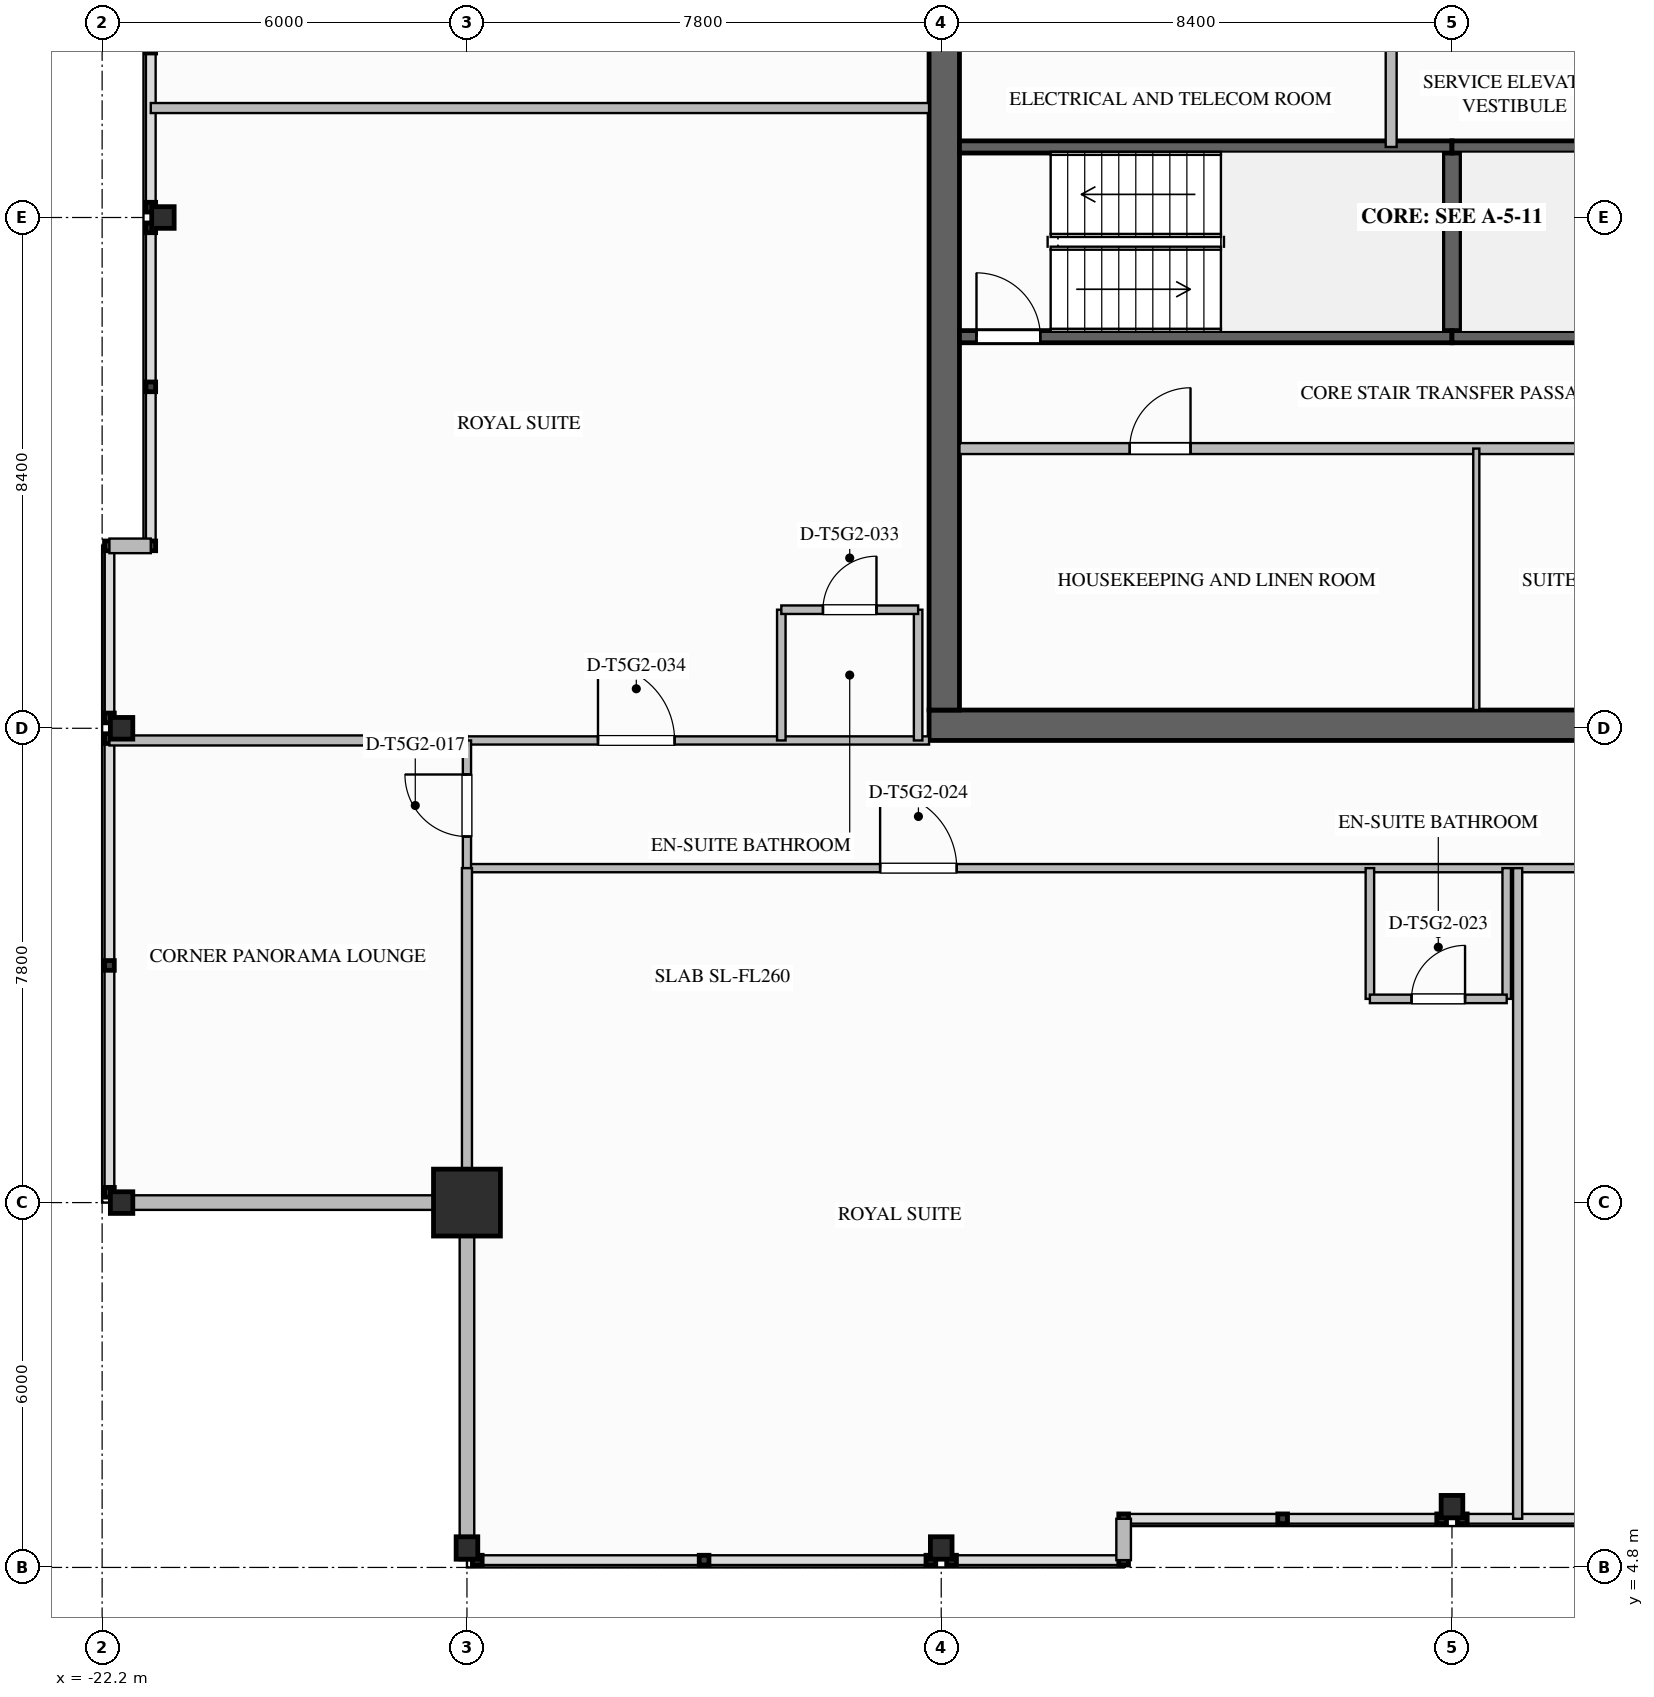
"""IFC4 building model, lengths in metres.
Left out: names, types, materials, properties, quantities, classifications, styles, units other than length and angle.
Written with IfcOpenShell. Run it as: python <this file> out.ifc"""

import sys

from ifc_helpers import new_model, si_unit, direction, frame, frame_2d, origin, origin_2d, place, context, subcontext, project, spatial, rectangle, i_section, extrude, element, fill, save


model = new_model("IFC4")
c1 = context("Model", 3, precision=1e-05, world=origin(), true_north=direction((0.0, 1.0)))
c2 = subcontext(c1, "Body", "Model", "MODEL_VIEW")
j1 = project(units=[si_unit("LENGTHUNIT", "METRE"), si_unit("PLANEANGLEUNIT", "RADIAN")], contexts=[c1])
p1 = place(None, origin())
s1 = spatial("IfcSite", under=j1, at=p1, CompositionType="ELEMENT")
p2 = place(p1, origin())
s2 = spatial("IfcBuilding", under=s1, at=p2, CompositionType="ELEMENT")
p3 = place(p2, frame((0.0, 0.0, 275.95)))
s3 = spatial("IfcBuildingStorey", under=s2, at=p3, CompositionType="ELEMENT", Elevation=275.95)
p4 = place(p3, frame((8.6, 18.65, 0.0), z_axis=(0.0, 0.0, 1.0), x_axis=(-1.0, 0.0, 0.0)))
e1 = element("IfcWall", 1, at=p4, inside=s3, PredefinedType="SHEAR", context=c2, shape_type="SweptSolid", body=[
    extrude(rectangle(XDim=17.2, YDim=0.5, at=frame_2d((8.6, 0.0))), origin(), (0.0, 0.0, 1.0), 3.65),
])
p5 = place(p3, frame((-8.35, 18.9, 0.0), z_axis=(0.0, 0.0, 1.0), x_axis=(0.0, 1.0, 0.0)))
e2 = element("IfcWall", 2, at=p5, inside=s3, PredefinedType="SHEAR", context=c2, shape_type="SweptSolid", body=[
    extrude(rectangle(XDim=16.2, YDim=0.5, at=frame_2d((8.1, 0.0))), origin(), (0.0, 0.0, 1.0), 3.65),
])
p6 = place(p3, frame((-16.2, 10.8, 0.0), z_axis=(0.0, 0.0, 1.0), x_axis=(1.0, 0.0, 0.0)))
e3 = element("IfcColumn", 3, at=p6, inside=s3, PredefinedType="COLUMN", context=c2, shape_type="SweptSolid", body=[
    extrude(rectangle(XDim=1.1, YDim=1.1, at=origin_2d()), origin(), (0.0, 0.0, 1.0), 3.65),
])
for number, where, z_axis, x_axis in (
    (4, (-21.88, 10.8, 0.0), (0.0, 0.0, 1.0), (1.0, 0.0, 0.0)),
    (5, (-21.88, 18.6, 0.0), (0.0, 0.0, 1.0), (1.0, 0.0, 0.0)),
    (6, (-21.2, 27.0, 0.0), (0.0, 0.0, 1.0), (1.0, 0.0, 0.0)),
    (7, (-16.2, 5.12, 0.0), (0.0, 0.0, 1.0), (0.0, 1.0, 0.0)),
    (8, (-8.4, 5.12, 0.0), (0.0, 0.0, 1.0), (0.0, 1.0, 0.0)),
    (9, (0.0, 5.8, 0.0), (0.0, 0.0, 1.0), (0.0, 1.0, 0.0)),
):
    element("IfcColumn", number, at=place(p3, frame(where, z_axis=z_axis, x_axis=x_axis)), inside=s3, PredefinedType="COLUMN", context=c2, shape_type="SweptSolid", body=[
        extrude(i_section(OverallWidth=0.369, OverallDepth=0.356, WebThickness=0.011, FlangeThickness=0.018, FilletRadius=0.025, at=origin_2d()), origin(), (0.0, 0.0, 1.0), 3.647),
    ])
for number, where, z_axis, x_axis in (
    (10, (-16.2, 4.92, 0.0), (0.0, 0.0, 1.0), (0.0, 1.0, 0.0)),
    (11, (-16.2, 10.8, 0.0), (0.0, 0.0, 1.0), (-1.0, 0.0, 0.0)),
):
    element("IfcWall", number, at=place(p3, frame(where, z_axis=z_axis, x_axis=x_axis)), inside=s3, PredefinedType="STANDARD", context=c2, shape_type="SweptSolid", body=[
        extrude(rectangle(XDim=5.88, YDim=0.24, at=frame_2d((2.94, 0.0))), origin(), (0.0, 0.0, 1.0), 2.779),
    ])
for number, where, z_axis, x_axis in (
    (12, (-22.08, 21.6, 0.0), (0.0, 0.0, 1.0), (1.0, 0.0, 0.0)),
    (13, (-5.4, 5.6, 0.0), (0.0, 0.0, 1.0), (0.0, -1.0, 0.0)),
):
    element("IfcWall", number, at=place(p3, frame(where, z_axis=z_axis, x_axis=x_axis)), inside=s3, PredefinedType="STANDARD", context=c2, shape_type="SweptSolid", body=[
        extrude(rectangle(XDim=0.68, YDim=0.24, at=frame_2d((0.34, 0.0))), origin(), (0.0, 0.0, 1.0), 3.39),
    ])
p7 = place(p3, frame((0.0, 25.04, 0.0), z_axis=(0.0, 0.0, 1.0), x_axis=(0.0, 1.0, 0.0)))
e14 = element("IfcWall", 14, at=p7, inside=s3, PredefinedType="SOLIDWALL", context=c2, shape_type="SweptSolid", body=[
    extrude(rectangle(XDim=3.12, YDim=0.3, at=frame_2d((1.56, 0.0))), origin(), (0.0, 0.0, 1.0), 3.39),
])
p8 = place(p3, frame((-8.1, 25.04, 0.0), z_axis=(0.0, 0.0, 1.0), x_axis=(1.0, 0.0, 0.0)))
e15 = element("IfcWall", 15, at=p8, inside=s3, PredefinedType="SOLIDWALL", context=c2, shape_type="SweptSolid", body=[
    extrude(rectangle(XDim=8.1, YDim=0.2, at=frame_2d((4.05, 0.0))), origin(), (0.0, 0.0, 1.0), 3.39),
])
p9 = place(p8, frame((0.28, 0.0, 0.0)))
e16 = element("IfcOpeningElement", 16, at=p9, cuts=e15, PredefinedType="OPENING", context=c2, shape_type="SweptSolid", body=[
    extrude(rectangle(XDim=1.05, YDim=2.1, at=frame_2d((0.525, 1.05))), frame((0.0, 0.11, 0.0), z_axis=(0.0, -1.0, 0.0), x_axis=(1.0, 0.0, 0.0)), (0.0, 0.0, 1.0), 0.22),
])
for number, where, z_axis, x_axis in (
    (17, (-8.1, 28.16, 0.0), (0.0, 0.0, 1.0), (1.0, 0.0, 0.0)),
    (18, (0.0, 25.04, 0.0), (0.0, 0.0, 1.0), (1.0, 0.0, 0.0)),
):
    element("IfcWall", number, at=place(p3, frame(where, z_axis=z_axis, x_axis=x_axis)), inside=s3, PredefinedType="SOLIDWALL", context=c2, shape_type="SweptSolid", body=[
        extrude(rectangle(XDim=8.1, YDim=0.2, at=frame_2d((4.05, 0.0))), origin(), (0.0, 0.0, 1.0), 3.39),
    ])
p10 = place(p3, frame((8.1, 28.16, 0.0), z_axis=(0.0, 0.0, 1.0), x_axis=(-1.0, 0.0, 0.0)))
e19 = element("IfcWall", 19, at=p10, inside=s3, PredefinedType="SOLIDWALL", context=c2, shape_type="SweptSolid", body=[
    extrude(rectangle(XDim=8.1, YDim=0.2, at=frame_2d((4.05, 0.0))), origin(), (0.0, 0.0, 1.0), 3.39),
])
p11 = place(p10, frame((0.28, 0.0, 0.0)))
e20 = element("IfcOpeningElement", 20, at=p11, cuts=e19, PredefinedType="OPENING", context=c2, shape_type="SweptSolid", body=[
    extrude(rectangle(XDim=1.05, YDim=2.1, at=frame_2d((0.525, 1.05))), frame((0.0, 0.11, 0.0), z_axis=(0.0, -1.0, 0.0), x_axis=(1.0, 0.0, 0.0)), (0.0, 0.0, 1.0), 0.22),
])
p12 = place(p3, frame((-1.0, 28.16, 0.0), z_axis=(0.0, 0.0, 1.0), x_axis=(0.0, 1.0, 0.0)))
e21 = element("IfcWall", 21, at=p12, inside=s3, PredefinedType="SOLIDWALL", context=c2, shape_type="SweptSolid", body=[
    extrude(rectangle(XDim=4.02, YDim=0.18, at=frame_2d((2.01, 0.0))), origin(), (0.0, 0.0, 1.0), 3.39),
])
p13 = place(p12, frame((2.49, 0.0, 0.0)))
e22 = element("IfcOpeningElement", 22, at=p13, cuts=e21, PredefinedType="OPENING", context=c2, shape_type="SweptSolid", body=[
    extrude(rectangle(XDim=1.0, YDim=2.1, at=frame_2d((0.5, 1.05))), frame((0.0, 0.1, 0.0), z_axis=(0.0, -1.0, 0.0), x_axis=(1.0, 0.0, 0.0)), (0.0, 0.0, 1.0), 0.2),
])
p14 = place(p3, frame((-8.1, 23.2, 0.0), z_axis=(0.0, 0.0, 1.0), x_axis=(1.0, 0.0, 0.0)))
e23 = element("IfcWall", 23, at=p14, inside=s3, PredefinedType="SOLIDWALL", context=c2, shape_type="SweptSolid", body=[
    extrude(rectangle(XDim=16.2, YDim=0.18, at=frame_2d((8.1, 0.0))), origin(), (0.0, 0.0, 1.0), 3.39),
])
p15 = place(p14, frame((2.8, 0.0, 0.0)))
e24 = element("IfcOpeningElement", 24, at=p15, cuts=e23, PredefinedType="OPENING", context=c2, shape_type="SweptSolid", body=[
    extrude(rectangle(XDim=1.0, YDim=2.1, at=frame_2d((0.5, 1.05))), frame((0.0, 0.1, 0.0), z_axis=(0.0, -1.0, 0.0), x_axis=(1.0, 0.0, 0.0)), (0.0, 0.0, 1.0), 0.2),
])
p16 = place(p14, frame((11.5, 0.0, 0.0)))
e25 = element("IfcOpeningElement", 25, at=p16, cuts=e23, PredefinedType="OPENING", context=c2, shape_type="SweptSolid", body=[
    extrude(rectangle(XDim=1.0, YDim=2.1, at=frame_2d((0.5, 1.05))), frame((0.0, 0.1, 0.0), z_axis=(0.0, -1.0, 0.0), x_axis=(1.0, 0.0, 0.0)), (0.0, 0.0, 1.0), 0.2),
])
p17 = place(p3, frame((0.4, 18.9, 0.0), z_axis=(0.0, 0.0, 1.0), x_axis=(0.0, 1.0, 0.0)))
e26 = element("IfcWall", 26, at=p17, inside=s3, PredefinedType="PARTITIONING", context=c2, shape_type="SweptSolid", body=[
    extrude(rectangle(XDim=4.3, YDim=0.1, at=frame_2d((2.15, 0.0))), origin(), (0.0, 0.0, 1.0), 3.39),
])
p18 = place(p3, frame((-16.2, 16.3, 0.0), z_axis=(0.0, 0.0, 1.0), x_axis=(1.0, 0.0, 0.0)))
e27 = element("IfcWall", 27, at=p18, inside=s3, PredefinedType="PARTITIONING", context=c2, shape_type="SweptSolid", body=[
    extrude(rectangle(XDim=38.28, YDim=0.135, at=frame_2d((19.14, 0.0))), origin(), (0.0, 0.0, 1.0), 3.39),
])
p19 = place(p18, frame((33.355, 0.0, 0.0)))
e28 = element("IfcOpeningElement", 28, at=p19, cuts=e27, PredefinedType="OPENING", context=c2, shape_type="SweptSolid", body=[
    extrude(rectangle(XDim=1.26, YDim=2.2, at=frame_2d((0.63, 1.1))), frame((0.0, 0.077, 0.0), z_axis=(0.0, -1.0, 0.0), x_axis=(1.0, 0.0, 0.0)), (0.0, 0.0, 1.0), 0.155),
])
p20 = place(p18, frame((6.795, 0.0, 0.0)))
e29 = element("IfcOpeningElement", 29, at=p20, cuts=e27, PredefinedType="OPENING", context=c2, shape_type="SweptSolid", body=[
    extrude(rectangle(XDim=1.26, YDim=2.2, at=frame_2d((0.63, 1.1))), frame((0.0, 0.077, 0.0), z_axis=(0.0, -1.0, 0.0), x_axis=(1.0, 0.0, 0.0)), (0.0, 0.0, 1.0), 0.155),
])
p21 = place(p18, frame((24.33, 0.0, 0.0)))
e30 = element("IfcOpeningElement", 30, at=p21, cuts=e27, PredefinedType="OPENING", context=c2, shape_type="SweptSolid", body=[
    extrude(rectangle(XDim=1.02, YDim=2.15, at=frame_2d((0.51, 1.075))), frame((0.0, 0.077, 0.0), z_axis=(0.0, -1.0, 0.0), x_axis=(1.0, 0.0, 0.0)), (0.0, 0.0, 1.0), 0.155),
])
p22 = place(p3, frame((-16.2, 18.4, 0.0), z_axis=(0.0, 0.0, 1.0), x_axis=(1.0, 0.0, 0.0)))
e31 = element("IfcWall", 31, at=p22, inside=s3, PredefinedType="PARTITIONING", context=c2, shape_type="SweptSolid", body=[
    extrude(rectangle(XDim=7.6, YDim=0.135, at=frame_2d((3.8, 0.0))), origin(), (0.0, 0.0, 1.0), 2.767),
])
p23 = place(p22, frame((2.155, 0.0, 0.0)))
e32 = element("IfcOpeningElement", 32, at=p23, cuts=e31, PredefinedType="OPENING", context=c2, shape_type="SweptSolid", body=[
    extrude(rectangle(XDim=1.26, YDim=2.2, at=frame_2d((0.63, 1.1))), frame((0.0, 0.077, 0.0), z_axis=(0.0, -1.0, 0.0), x_axis=(1.0, 0.0, 0.0)), (0.0, 0.0, 1.0), 0.155),
])
p24 = place(p3, frame((-16.2, 16.3, 0.0), z_axis=(0.0, 0.0, 1.0), x_axis=(0.0, 1.0, 0.0)))
e33 = element("IfcWall", 33, at=p24, inside=s3, PredefinedType="PARTITIONING", context=c2, shape_type="SweptSolid", body=[
    extrude(rectangle(XDim=2.1, YDim=0.135, at=frame_2d((1.05, 0.0))), origin(), (0.0, 0.0, 1.0), 2.764),
])
p25 = place(p24, frame((0.52, 0.0, 0.0)))
e34 = element("IfcOpeningElement", 34, at=p25, cuts=e33, PredefinedType="OPENING", context=c2, shape_type="SweptSolid", body=[
    extrude(rectangle(XDim=1.02, YDim=2.15, at=frame_2d((0.51, 1.075))), frame((0.0, 0.077, 0.0), z_axis=(0.0, -1.0, 0.0), x_axis=(1.0, 0.0, 0.0)), (0.0, 0.0, 1.0), 0.155),
])
p26 = place(p3, frame((-16.2, 10.92, 0.0), z_axis=(0.0, 0.0, 1.0), x_axis=(0.0, 1.0, 0.0)))
e35 = element("IfcWall", 35, at=p26, inside=s3, PredefinedType="PARTITIONING", context=c2, shape_type="SweptSolid", body=[
    extrude(rectangle(XDim=5.38, YDim=0.165, at=frame_2d((2.69, 0.0))), origin(), (0.0, 0.0, 1.0), 2.764),
])
p27 = place(p3, frame((-22.08, 18.4, 0.0), z_axis=(0.0, 0.0, 1.0), x_axis=(1.0, 0.0, 0.0)))
e36 = element("IfcWall", 36, at=p27, inside=s3, PredefinedType="PARTITIONING", context=c2, shape_type="SweptSolid", body=[
    extrude(rectangle(XDim=5.88, YDim=0.165, at=frame_2d((2.94, 0.0))), origin(), (0.0, 0.0, 1.0), 2.764),
])
for number, where, z_axis, x_axis in (
    (37, (-1.35, 16.3, 0.0), (0.0, 0.0, 1.0), (0.0, -1.0, 0.0)),
    (38, (0.9, 16.3, 0.0), (0.0, 0.0, 1.0), (0.0, -1.0, 0.0)),
):
    element("IfcWall", number, at=place(p3, frame(where, z_axis=z_axis, x_axis=x_axis)), inside=s3, PredefinedType="PLUMBINGWALL", context=c2, shape_type="SweptSolid", body=[
        extrude(rectangle(XDim=2.15, YDim=0.14, at=frame_2d((1.075, 0.0))), origin(), (0.0, 0.0, 1.0), 3.39),
    ])
p28 = place(p3, frame((-1.35, 14.15, 0.0), z_axis=(0.0, 0.0, 1.0), x_axis=(1.0, 0.0, 0.0)))
e39 = element("IfcWall", 39, at=p28, inside=s3, PredefinedType="PLUMBINGWALL", context=c2, shape_type="SweptSolid", body=[
    extrude(rectangle(XDim=2.25, YDim=0.14, at=frame_2d((1.125, 0.0))), origin(), (0.0, 0.0, 1.0), 3.39),
])
p29 = place(p28, frame((0.685, 0.0, 0.0)))
e40 = element("IfcOpeningElement", 40, at=p29, cuts=e39, PredefinedType="OPENING", context=c2, shape_type="SweptSolid", body=[
    extrude(rectangle(XDim=0.88, YDim=2.1, at=frame_2d((0.44, 1.05))), frame((0.0, 0.08, 0.0), z_axis=(0.0, -1.0, 0.0), x_axis=(1.0, 0.0, 0.0)), (0.0, 0.0, 1.0), 0.16),
])
p30 = place(p3, frame((1.08, 5.6, 0.0), z_axis=(0.0, 0.0, 1.0), x_axis=(0.0, 1.0, 0.0)))
e41 = element("IfcWall", 41, at=p30, inside=s3, PredefinedType="PARTITIONING", context=c2, shape_type="SweptSolid", body=[
    extrude(rectangle(XDim=10.7, YDim=0.15, at=frame_2d((5.35, 0.0))), origin(), (0.0, 0.0, 1.0), 3.39),
])
p31 = place(p3, frame((-21.4, 28.8, 0.0), z_axis=(0.0, 0.0, 1.0), x_axis=(1.0, 0.0, 0.0)))
e42 = element("IfcWall", 42, at=p31, inside=s3, PredefinedType="PARTITIONING", context=c2, shape_type="SweptSolid", body=[
    extrude(rectangle(XDim=12.8, YDim=0.165, at=frame_2d((6.4, 0.0))), origin(), (0.0, 0.0, 1.0), 3.39),
])
for number, where, z_axis, x_axis in (
    (43, (-11.03, 18.4, 0.0), (0.0, 0.0, 1.0), (0.0, 1.0, 0.0)),
    (44, (-8.78, 18.4, 0.0), (0.0, 0.0, 1.0), (0.0, 1.0, 0.0)),
):
    element("IfcWall", number, at=place(p3, frame(where, z_axis=z_axis, x_axis=x_axis)), inside=s3, PredefinedType="PLUMBINGWALL", context=c2, shape_type="SweptSolid", body=[
        extrude(rectangle(XDim=2.15, YDim=0.14, at=frame_2d((1.075, 0.0))), origin(), (0.0, 0.0, 1.0), 3.39),
    ])
p32 = place(p3, frame((-11.03, 20.55, 0.0), z_axis=(0.0, 0.0, 1.0), x_axis=(1.0, 0.0, 0.0)))
e45 = element("IfcWall", 45, at=p32, inside=s3, PredefinedType="PLUMBINGWALL", context=c2, shape_type="SweptSolid", body=[
    extrude(rectangle(XDim=2.25, YDim=0.14, at=frame_2d((1.125, 0.0))), origin(), (0.0, 0.0, 1.0), 3.39),
])
p33 = place(p32, frame((0.685, 0.0, 0.0)))
e46 = element("IfcOpeningElement", 46, at=p33, cuts=e45, PredefinedType="OPENING", context=c2, shape_type="SweptSolid", body=[
    extrude(rectangle(XDim=0.88, YDim=2.1, at=frame_2d((0.44, 1.05))), frame((0.0, 0.08, 0.0), z_axis=(0.0, -1.0, 0.0), x_axis=(1.0, 0.0, 0.0)), (0.0, 0.0, 1.0), 0.16),
])
p34 = place(p9, origin())
e47 = element("IfcDoor", 47, at=p34, inside=s3, OperationType="SINGLE_SWING_LEFT", PredefinedType="DOOR", context=c2, shape_type="SweptSolid", body=[
    extrude(rectangle(XDim=1.05, YDim=2.1, at=frame_2d((0.525, 1.05))), frame((0.0, 0.025, 0.0), z_axis=(0.0, -1.0, 0.0), x_axis=(1.0, 0.0, 0.0)), (0.0, 0.0, 1.0), 0.05),
])
fill(e16, e47)
p35 = place(p15, origin())
e48 = element("IfcDoor", 48, at=p35, inside=s3, OperationType="SINGLE_SWING_RIGHT", PredefinedType="DOOR", context=c2, shape_type="SweptSolid", body=[
    extrude(rectangle(XDim=1.0, YDim=2.1, at=frame_2d((0.5, 1.05))), frame((0.0, 0.025, 0.0), z_axis=(0.0, -1.0, 0.0), x_axis=(1.0, 0.0, 0.0)), (0.0, 0.0, 1.0), 0.05),
])
fill(e24, e48)
p36 = place(p25, origin())
e49 = element("IfcDoor", 49, at=p36, inside=s3, OperationType="SINGLE_SWING_RIGHT", PredefinedType="DOOR", context=c2, shape_type="SweptSolid", body=[
    extrude(rectangle(XDim=1.02, YDim=2.15, at=frame_2d((0.51, 1.075))), frame((0.0, 0.025, 0.0), z_axis=(0.0, -1.0, 0.0), x_axis=(1.0, 0.0, 0.0)), (0.0, 0.0, 1.0), 0.05),
])
fill(e34, e49)
p37 = place(p29, origin())
e50 = element("IfcDoor", 50, at=p37, inside=s3, OperationType="SINGLE_SWING_RIGHT", PredefinedType="DOOR", context=c2, shape_type="SweptSolid", body=[
    extrude(rectangle(XDim=0.88, YDim=2.1, at=frame_2d((0.44, 1.05))), frame((0.0, 0.025, 0.0), z_axis=(0.0, -1.0, 0.0), x_axis=(1.0, 0.0, 0.0)), (0.0, 0.0, 1.0), 0.05),
])
fill(e40, e50)
p38 = place(p20, origin())
e51 = element("IfcDoor", 51, at=p38, inside=s3, OperationType="SINGLE_SWING_LEFT", PredefinedType="DOOR", context=c2, shape_type="SweptSolid", body=[
    extrude(rectangle(XDim=1.26, YDim=2.2, at=frame_2d((0.63, 1.1))), frame((0.0, 0.025, 0.0), z_axis=(0.0, -1.0, 0.0), x_axis=(1.0, 0.0, 0.0)), (0.0, 0.0, 1.0), 0.05),
])
fill(e29, e51)
p39 = place(p33, origin())
e52 = element("IfcDoor", 52, at=p39, inside=s3, OperationType="SINGLE_SWING_RIGHT", PredefinedType="DOOR", context=c2, shape_type="SweptSolid", body=[
    extrude(rectangle(XDim=0.88, YDim=2.1, at=frame_2d((0.44, 1.05))), frame((0.0, 0.025, 0.0), z_axis=(0.0, -1.0, 0.0), x_axis=(1.0, 0.0, 0.0)), (0.0, 0.0, 1.0), 0.05),
])
fill(e46, e52)
p40 = place(p23, origin())
e53 = element("IfcDoor", 53, at=p40, inside=s3, OperationType="SINGLE_SWING_LEFT", PredefinedType="DOOR", context=c2, shape_type="SweptSolid", body=[
    extrude(rectangle(XDim=1.26, YDim=2.2, at=frame_2d((0.63, 1.1))), frame((0.0, 0.025, 0.0), z_axis=(0.0, -1.0, 0.0), x_axis=(1.0, 0.0, 0.0)), (0.0, 0.0, 1.0), 0.05),
])
fill(e32, e53)
save(model, sys.argv[1])
